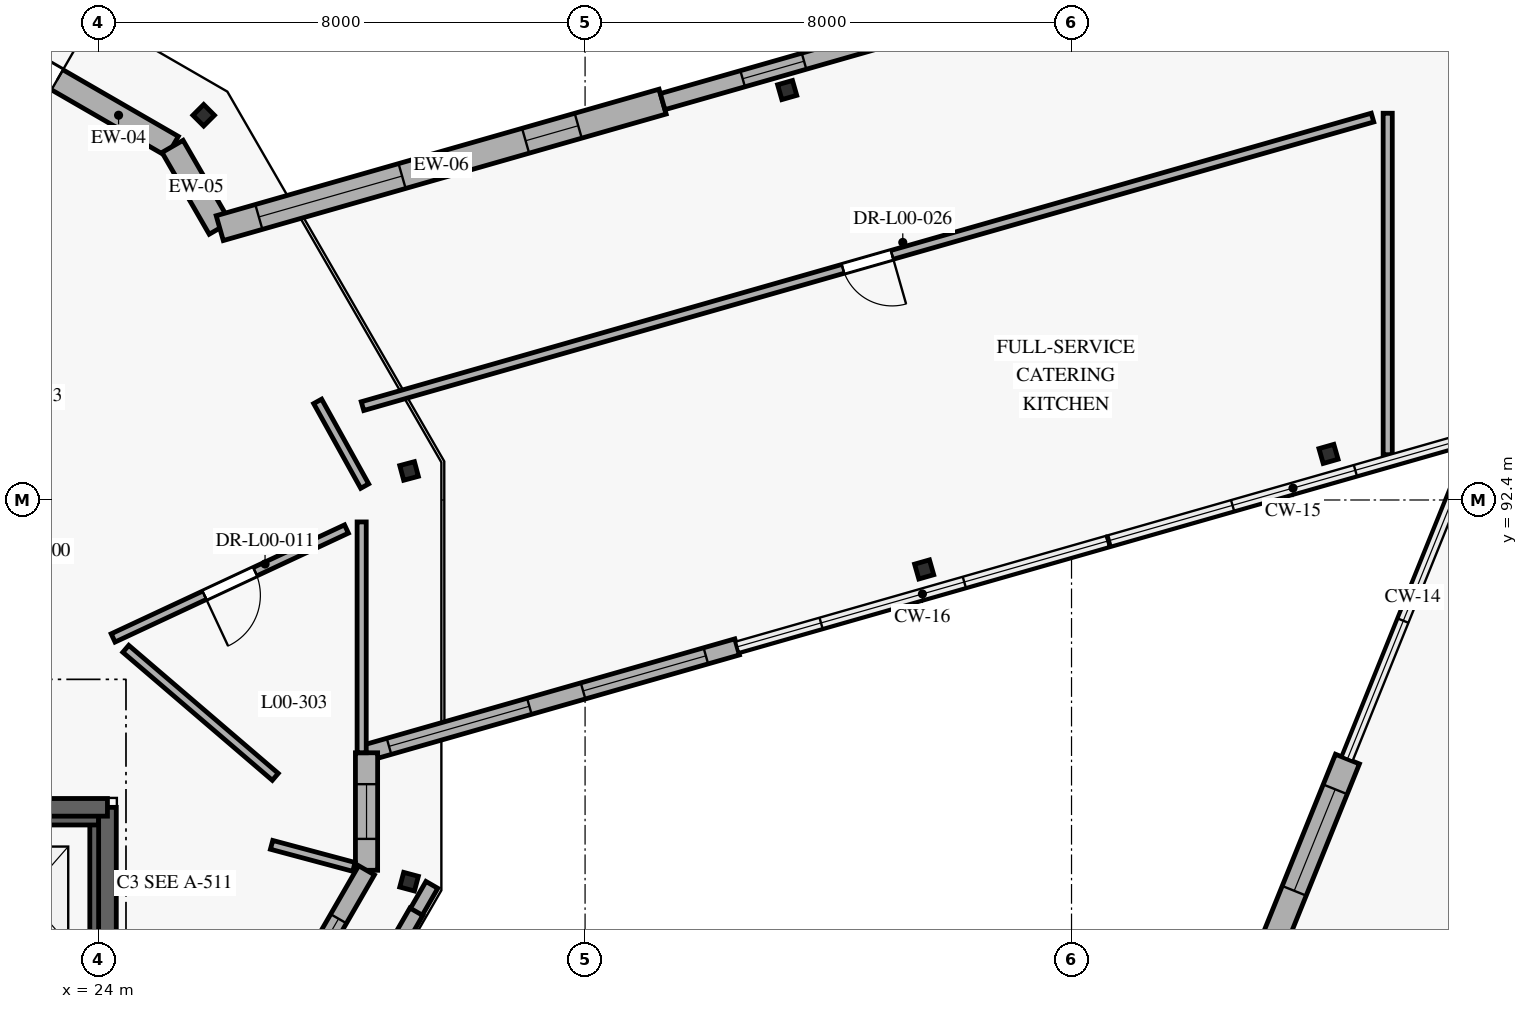
"""IFC4 building model, lengths in metres.
Left out: names, types, materials, properties, quantities, classifications, styles, units other than length and angle.
Written with IfcOpenShell. Run it as: python <this file> out.ifc"""

import sys

from ifc_helpers import new_model, si_unit, direction, frame, frame_2d, origin, origin_2d, place, context, subcontext, project, spatial, rectangle, hollow_rectangle, i_section, extrude, element, fill, save


model = new_model("IFC4")
c1 = context("Model", 3, precision=1e-05, world=origin(), true_north=direction((0.0, 1.0)))
c2 = subcontext(c1, "Body", "Model", "MODEL_VIEW")
j1 = project(units=[si_unit("LENGTHUNIT", "METRE"), si_unit("PLANEANGLEUNIT", "RADIAN")], contexts=[c1])
p1 = place(None, origin())
s1 = spatial("IfcSite", under=j1, at=p1, CompositionType="ELEMENT")
p2 = place(p1, origin())
s2 = spatial("IfcBuilding", under=s1, at=p2, CompositionType="ELEMENT")
p3 = place(p2, origin())
s3 = spatial("IfcBuildingStorey", under=s2, at=p3, CompositionType="ELEMENT", Elevation=0.0)
for number, where, z_axis, x_axis in (
    (1, (29.105, 92.878, 0.0), (0.0, 0.0, 1.0), (-0.259, 0.966, 0.0)),
    (2, (25.728, 98.728, 0.0), (0.0, 0.0, 1.0), (-0.707, 0.707, 0.0)),
    (3, (29.105, 86.122, 0.0), (0.0, 0.0, 1.0), (0.259, 0.966, 0.0)),
):
    element("IfcColumn", number, at=place(p3, frame(where, z_axis=z_axis, x_axis=x_axis)), inside=s3, PredefinedType="COLUMN", context=c2, shape_type="SweptSolid", body=[
        extrude(hollow_rectangle(XDim=0.25, YDim=0.25, WallThickness=0.012, InnerFilletRadius=0.012, OuterFilletRadius=0.019, at=origin_2d()), origin(), (0.0, 0.0, 1.0), 4.2),
    ])
for number, where, z_axis, x_axis in (
    (4, (35.323, 99.142, 0.0), (0.0, 0.0, 1.0), (0.962, 0.275, 0.0)),
    (5, (37.576, 91.258, 0.0), (0.0, 0.0, 1.0), (0.962, 0.275, 0.0)),
    (6, (44.226, 93.158, 0.0), (0.0, 0.0, 1.0), (0.962, 0.275, 0.0)),
):
    element("IfcColumn", number, at=place(p3, frame(where, z_axis=z_axis, x_axis=x_axis)), inside=s3, PredefinedType="COLUMN", context=c2, shape_type="SweptSolid", body=[
        extrude(i_section(OverallWidth=0.255, OverallDepth=0.254, WebThickness=0.009, FlangeThickness=0.014, FilletRadius=0.013, at=origin_2d()), origin(), (0.0, 0.0, 1.0), 4.2),
    ])
p4 = place(p3, frame((19.69, 101.406, 0.0), z_axis=(0.0, 0.0, 1.0), x_axis=(0.866044766488, -0.499966461314, 0.0)))
e7 = element("IfcWall", 7, at=p4, inside=s3, PredefinedType="SOLIDWALL", context=c2, shape_type="SweptSolid", body=[
    extrude(rectangle(XDim=6.38, YDim=0.38, at=frame_2d((3.19, 0.0))), origin(), (0.0, 0.0, 1.0), 3.94),
])
p5 = place(p4, frame((2.19, 0.0, 0.0)))
e8 = element("IfcOpeningElement", 8, at=p5, cuts=e7, PredefinedType="OPENING", context=c2, shape_type="SweptSolid", body=[
    extrude(rectangle(XDim=2.0, YDim=2.2, at=frame_2d((1.0, 1.1))), frame((0.0, 0.2, 0.0), z_axis=(0.0, -1.0, 0.0), x_axis=(1.0, 0.0, 0.0)), (0.0, 0.0, 1.0), 0.4),
])
p6 = place(p3, frame((25.216, 98.216, 0.0), z_axis=(0.0, 0.0, 1.0), x_axis=(0.499758756264, -0.866164641127, 0.0)))
e9 = element("IfcWall", 9, at=p6, inside=s3, PredefinedType="SOLIDWALL", context=c2, shape_type="SweptSolid", body=[
    extrude(rectangle(XDim=1.552, YDim=0.4, at=frame_2d((0.776, 0.0))), origin(), (0.0, 0.0, 1.0), 3.94),
])
p7 = place(p3, frame((25.992, 96.871, 0.0), z_axis=(0.0, 0.0, 1.0), x_axis=(0.961523947641, 0.274721127897, 0.0)))
e10 = element("IfcWall", 10, at=p7, inside=s3, PredefinedType="SOLIDWALL", context=c2, shape_type="SweptSolid", body=[
    extrude(rectangle(XDim=7.575, YDim=0.425, at=frame_2d((3.788, 0.0))), origin(), (0.0, 0.0, 1.0), 3.94),
])
p8 = place(p7, frame((0.669, 0.0, 0.85)))
e11 = element("IfcOpeningElement", 11, at=p8, cuts=e10, PredefinedType="OPENING", context=c2, shape_type="SweptSolid", body=[
    extrude(rectangle(XDim=2.45, YDim=1.4, at=frame_2d((1.225, 0.7))), frame((0.0, 0.222, 0.0), z_axis=(0.0, -1.0, 0.0), x_axis=(1.0, 0.0, 0.0)), (0.0, 0.0, 1.0), 0.445),
])
p9 = place(p7, frame((5.231, 0.0, 0.85)))
e12 = element("IfcOpeningElement", 12, at=p9, cuts=e10, PredefinedType="OPENING", context=c2, shape_type="SweptSolid", body=[
    extrude(rectangle(XDim=0.9, YDim=1.6, at=frame_2d((0.45, 0.8))), frame((0.0, 0.222, 0.0), z_axis=(0.0, -1.0, 0.0), x_axis=(1.0, 0.0, 0.0)), (0.0, 0.0, 1.0), 0.445),
])
p10 = place(p3, frame((33.275, 98.952, 0.0), z_axis=(0.0, 0.0, 1.0), x_axis=(0.961523947641, 0.274721127897, 0.0)))
e13 = element("IfcWall", 13, at=p10, inside=s3, PredefinedType="SOLIDWALL", context=c2, shape_type="SweptSolid", body=[
    extrude(rectangle(XDim=7.575, YDim=0.275, at=frame_2d((3.788, 0.0))), origin(), (0.0, 0.0, 1.0), 3.94),
])
p11 = place(p10, frame((1.369, 0.0, 0.85)))
e14 = element("IfcOpeningElement", 14, at=p11, cuts=e13, PredefinedType="OPENING", context=c2, shape_type="SweptSolid", body=[
    extrude(rectangle(XDim=1.05, YDim=1.6, at=frame_2d((0.525, 0.8))), frame((0.0, 0.147, 0.0), z_axis=(0.0, -1.0, 0.0), x_axis=(1.0, 0.0, 0.0)), (0.0, 0.0, 1.0), 0.295),
])
p12 = place(p10, frame((5.081, 0.0, 0.85)))
e15 = element("IfcOpeningElement", 15, at=p12, cuts=e13, PredefinedType="OPENING", context=c2, shape_type="SweptSolid", body=[
    extrude(rectangle(XDim=1.2, YDim=1.6, at=frame_2d((0.6, 0.8))), frame((0.0, 0.147, 0.0), z_axis=(0.0, -1.0, 0.0), x_axis=(1.0, 0.0, 0.0)), (0.0, 0.0, 1.0), 0.295),
])
p13 = place(p3, frame((42.385, 82.812, 0.0), z_axis=(0.0, 0.0, 1.0), x_axis=(0.374611990703, 0.927181673903, 0.0)))
e16 = element("IfcWall", 16, at=p13, inside=s3, PredefinedType="SOLIDWALL", context=c2, shape_type="SweptSolid", body=[
    extrude(rectangle(XDim=5.746, YDim=0.425, at=frame_2d((2.873, 0.0))), origin(), (0.0, 0.0, 1.0), 3.94),
])
p14 = place(p13, frame((0.686, 0.0, 0.85)))
e17 = element("IfcOpeningElement", 17, at=p14, cuts=e16, PredefinedType="OPENING", context=c2, shape_type="SweptSolid", body=[
    extrude(rectangle(XDim=1.5, YDim=1.15, at=frame_2d((0.75, 0.575))), frame((0.0, 0.222, 0.0), z_axis=(0.0, -1.0, 0.0), x_axis=(1.0, 0.0, 0.0)), (0.0, 0.0, 1.0), 0.445),
])
p15 = place(p13, frame((3.409, 0.0, 0.85)))
e18 = element("IfcOpeningElement", 18, at=p15, cuts=e16, PredefinedType="OPENING", context=c2, shape_type="SweptSolid", body=[
    extrude(rectangle(XDim=1.8, YDim=1.15, at=frame_2d((0.9, 0.575))), frame((0.0, 0.222, 0.0), z_axis=(0.0, -1.0, 0.0), x_axis=(1.0, 0.0, 0.0)), (0.0, 0.0, 1.0), 0.445),
])
p16 = place(p3, frame((34.5, 89.984, 0.0), z_axis=(0.0, 0.0, 1.0), x_axis=(-0.96152976126, -0.274700779415, 0.0)))
e19 = element("IfcWall", 19, at=p16, inside=s3, PredefinedType="SOLIDWALL", context=c2, shape_type="SweptSolid", body=[
    extrude(rectangle(XDim=6.339, YDim=0.275, at=frame_2d((3.169, 0.0))), origin(), (0.0, 0.0, 1.0), 3.94),
])
p17 = place(p16, frame((0.535, 0.0, 0.85)))
e20 = element("IfcOpeningElement", 20, at=p17, cuts=e19, PredefinedType="OPENING", context=c2, shape_type="SweptSolid", body=[
    extrude(rectangle(XDim=2.1, YDim=1.15, at=frame_2d((1.05, 0.575))), frame((0.0, 0.147, 0.0), z_axis=(0.0, -1.0, 0.0), x_axis=(1.0, 0.0, 0.0)), (0.0, 0.0, 1.0), 0.295),
])
p18 = place(p16, frame((3.554, 0.0, 0.85)))
e21 = element("IfcOpeningElement", 21, at=p18, cuts=e19, PredefinedType="OPENING", context=c2, shape_type="SweptSolid", body=[
    extrude(rectangle(XDim=2.4, YDim=1.15, at=frame_2d((1.2, 0.575))), frame((0.0, 0.147, 0.0), z_axis=(0.0, -1.0, 0.0), x_axis=(1.0, 0.0, 0.0)), (0.0, 0.0, 1.0), 0.295),
])
p19 = place(p3, frame((28.406, 88.242, 0.0), z_axis=(0.0, 0.0, 1.0), x_axis=(0.0, -1.0, 0.0)))
e22 = element("IfcWall", 22, at=p19, inside=s3, PredefinedType="SOLIDWALL", context=c2, shape_type="SweptSolid", body=[
    extrude(rectangle(XDim=1.933, YDim=0.365, at=frame_2d((0.966, 0.0))), origin(), (0.0, 0.0, 1.0), 3.94),
])
p20 = place(p19, frame((0.516, 0.0, 0.85)))
e23 = element("IfcOpeningElement", 23, at=p20, cuts=e22, PredefinedType="OPENING", context=c2, shape_type="SweptSolid", body=[
    extrude(rectangle(XDim=0.9, YDim=1.6, at=frame_2d((0.45, 0.8))), frame((0.0, 0.192, 0.0), z_axis=(0.0, -1.0, 0.0), x_axis=(1.0, 0.0, 0.0)), (0.0, 0.0, 1.0), 0.385),
])
p21 = place(p3, frame((28.406, 86.31, 0.0), z_axis=(0.0, 0.0, 1.0), x_axis=(-0.499966461314, -0.866044766488, 0.0)))
e24 = element("IfcWall", 24, at=p21, inside=s3, PredefinedType="SOLIDWALL", context=c2, shape_type="SweptSolid", body=[
    extrude(rectangle(XDim=6.38, YDim=0.3, at=frame_2d((3.19, 0.0))), origin(), (0.0, 0.0, 1.0), 3.94),
])
p22 = place(p21, frame((0.92, 0.0, 0.85)))
e25 = element("IfcOpeningElement", 25, at=p22, cuts=e24, PredefinedType="OPENING", context=c2, shape_type="SweptSolid", body=[
    extrude(rectangle(XDim=1.35, YDim=1.3, at=frame_2d((0.675, 0.65))), frame((0.0, 0.16, 0.0), z_axis=(0.0, -1.0, 0.0), x_axis=(1.0, 0.0, 0.0)), (0.0, 0.0, 1.0), 0.32),
])
p23 = place(p21, frame((3.91, 0.0, 0.85)))
e26 = element("IfcOpeningElement", 26, at=p23, cuts=e24, PredefinedType="OPENING", context=c2, shape_type="SweptSolid", body=[
    extrude(rectangle(XDim=1.75, YDim=1.3, at=frame_2d((0.875, 0.65))), frame((0.0, 0.16, 0.0), z_axis=(0.0, -1.0, 0.0), x_axis=(1.0, 0.0, 0.0)), (0.0, 0.0, 1.0), 0.32),
])
p24 = place(p3, frame((25.961, 79.973, 0.0), z_axis=(0.0, 0.0, 1.0), x_axis=(0.500010639957, 0.866019260715, 0.0)))
e27 = element("IfcWall", 27, at=p24, inside=s3, PredefinedType="ELEMENTEDWALL", context=c2, shape_type="SweptSolid", body=[
    extrude(rectangle(XDim=7.04, YDim=0.225, at=frame_2d((3.52, 0.0))), origin(), (0.0, 0.0, 1.0), 0.55),
])
p25 = place(p3, frame((28.856, 84.988, 0.55), z_axis=(0.0, 0.0, 1.0), x_axis=(0.500189527592, 0.865915952323, 0.0)))
e28 = element("IfcWall", 28, at=p25, inside=s3, PredefinedType="ELEMENTEDWALL", context=c2, shape_type="SweptSolid", body=[
    extrude(rectangle(XDim=0.739, YDim=0.245, at=frame_2d((0.37, 0.0))), origin(), (0.0, 0.0, 1.0), 3.39),
])
p26 = place(p3, frame((24.0, 84.6, -1.4), z_axis=(0.0, 0.0, 1.0), x_axis=(0.0, 1.0, 0.0)))
e29 = element("IfcWall", 29, at=p26, inside=s3, PredefinedType="SHEAR", context=c2, shape_type="SweptSolid", body=[
    extrude(rectangle(XDim=2.6, YDim=0.29, at=frame_2d((1.3, 0.0))), origin(), (0.0, 0.0, 1.0), 1.4),
])
p27 = place(p3, frame((24.0, 87.2, -1.4), z_axis=(0.0, 0.0, 1.0), x_axis=(-1.0, 0.0, 0.0)))
e30 = element("IfcWall", 30, at=p27, inside=s3, PredefinedType="SHEAR", context=c2, shape_type="SweptSolid", body=[
    extrude(rectangle(XDim=2.4, YDim=0.29, at=frame_2d((1.2, 0.0))), origin(), (0.0, 0.0, 1.0), 1.4),
])
p28 = place(p3, frame((24.145, 84.455, 0.0), z_axis=(0.0, 0.0, 1.0), x_axis=(0.0, 1.0, 0.0)))
e31 = element("IfcWall", 31, at=p28, inside=s3, PredefinedType="SHEAR", context=c2, shape_type="SweptSolid", body=[
    extrude(rectangle(XDim=2.89, YDim=0.29, at=frame_2d((1.445, 0.0))), origin(), (0.0, 0.0, 1.0), 3.95),
])
p29 = place(p3, frame((24.145, 87.345, 0.0), z_axis=(0.0, 0.0, 1.0), x_axis=(-1.0, 0.0, 0.0)))
e32 = element("IfcWall", 32, at=p29, inside=s3, PredefinedType="SHEAR", context=c2, shape_type="SweptSolid", body=[
    extrude(rectangle(XDim=2.69, YDim=0.29, at=frame_2d((1.345, 0.0))), origin(), (0.0, 0.0, 1.0), 3.95),
])
p30 = place(p3, frame((26.844, 86.728, 0.0), z_axis=(0.0, 0.0, 1.0), x_axis=(0.965916169592, -0.258855081698, 0.0)))
e33 = element("IfcWall", 33, at=p30, inside=s3, PredefinedType="PARTITIONING", context=c2, shape_type="SweptSolid", body=[
    extrude(rectangle(XDim=1.402, YDim=0.15, at=frame_2d((0.701, 0.0))), origin(), (0.0, 0.0, 1.0), 3.915),
])
p31 = place(p3, frame((28.326, 88.243, 0.0), z_axis=(0.0, 0.0, 1.0), x_axis=(0.0, 1.0, 0.0)))
e34 = element("IfcWall", 34, at=p31, inside=s3, PredefinedType="PARTITIONING", context=c2, shape_type="SweptSolid", body=[
    extrude(rectangle(XDim=3.796, YDim=0.15, at=frame_2d((1.898, 0.0))), origin(), (0.0, 0.0, 1.0), 3.915),
])
p32 = place(p3, frame((28.076, 91.923, 0.0), z_axis=(0.0, 0.0, 1.0), x_axis=(-0.906140423984, -0.422976987579, 0.0)))
e35 = element("IfcWall", 35, at=p32, inside=s3, PredefinedType="PARTITIONING", context=c2, shape_type="SweptSolid", body=[
    extrude(rectangle(XDim=4.235, YDim=0.15, at=frame_2d((2.117, 0.0))), origin(), (0.0, 0.0, 1.0), 3.915),
])
p33 = place(p32, frame((1.657, 0.0, 0.0)))
e36 = element("IfcOpeningElement", 36, at=p33, cuts=e35, PredefinedType="OPENING", context=c2, shape_type="SweptSolid", body=[
    extrude(rectangle(XDim=0.92, YDim=2.08, at=frame_2d((0.46, 1.04))), frame((0.0, 0.085, 0.0), z_axis=(0.0, -1.0, 0.0), x_axis=(1.0, 0.0, 0.0)), (0.0, 0.0, 1.0), 0.17),
])
p34 = place(p3, frame((24.447, 89.953, 0.0), z_axis=(0.0, 0.0, 1.0), x_axis=(0.759458863271, -0.650555328161, 0.0)))
e37 = element("IfcWall", 37, at=p34, inside=s3, PredefinedType="PARTITIONING", context=c2, shape_type="SweptSolid", body=[
    extrude(rectangle(XDim=3.237, YDim=0.15, at=frame_2d((1.619, 0.0))), origin(), (0.0, 0.0, 1.0), 3.915),
])
p35 = place(p3, frame((45.2, 93.145, 0.0), z_axis=(0.0, 0.0, 1.0), x_axis=(0.0, 1.0, 0.0)))
e38 = element("IfcWall", 38, at=p35, inside=s3, PredefinedType="PARTITIONING", context=c2, shape_type="SweptSolid", body=[
    extrude(rectangle(XDim=5.616, YDim=0.15, at=frame_2d((2.808, 0.0))), origin(), (0.0, 0.0, 1.0), 3.915),
])
p36 = place(p3, frame((44.95, 98.689, 0.0), z_axis=(0.0, 0.0, 1.0), x_axis=(-0.961522347689, -0.274726727666, 0.0)))
e39 = element("IfcWall", 39, at=p36, inside=s3, PredefinedType="PARTITIONING", context=c2, shape_type="SweptSolid", body=[
    extrude(rectangle(XDim=17.275, YDim=0.15, at=frame_2d((8.637, 0.0))), origin(), (0.0, 0.0, 1.0), 3.915),
])
p37 = place(p36, frame((8.217, 0.0, 0.0)))
e40 = element("IfcOpeningElement", 40, at=p37, cuts=e39, PredefinedType="OPENING", context=c2, shape_type="SweptSolid", body=[
    extrude(rectangle(XDim=0.84, YDim=2.04, at=frame_2d((0.42, 1.02))), frame((0.0, 0.085, 0.0), z_axis=(0.0, -1.0, 0.0), x_axis=(1.0, 0.0, 0.0)), (0.0, 0.0, 1.0), 0.17),
])
p38 = place(p3, frame((27.602, 94.022, 0.0), z_axis=(0.0, 0.0, 1.0), x_axis=(0.485330821968, -0.874330597227, 0.0)))
e41 = element("IfcWall", 41, at=p38, inside=s3, PredefinedType="PARTITIONING", context=c2, shape_type="SweptSolid", body=[
    extrude(rectangle(XDim=1.594, YDim=0.15, at=frame_2d((0.797, 0.0))), origin(), (0.0, 0.0, 1.0), 3.915),
])
p39 = place(p5, origin())
e42 = element("IfcDoor", 42, at=p39, inside=s3, OperationType="DOUBLE_DOOR_SINGLE_SWING", PredefinedType="DOOR", context=c2, shape_type="SweptSolid", body=[
    extrude(rectangle(XDim=2.0, YDim=2.2, at=frame_2d((1.0, 1.1))), frame((0.0, 0.025, 0.0), z_axis=(0.0, -1.0, 0.0), x_axis=(1.0, 0.0, 0.0)), (0.0, 0.0, 1.0), 0.05),
])
fill(e8, e42)
p40 = place(p8, origin())
e43 = element("IfcWindow", 43, at=p40, inside=s3, PartitioningType="SINGLE_PANEL", PredefinedType="WINDOW", context=c2, shape_type="SweptSolid", body=[
    extrude(rectangle(XDim=2.45, YDim=1.4, at=frame_2d((1.225, 0.7))), frame((0.0, 0.03, 0.0), z_axis=(0.0, -1.0, 0.0), x_axis=(1.0, 0.0, 0.0)), (0.0, 0.0, 1.0), 0.06),
])
fill(e11, e43)
p41 = place(p9, origin())
e44 = element("IfcWindow", 44, at=p41, inside=s3, PartitioningType="SINGLE_PANEL", PredefinedType="WINDOW", context=c2, shape_type="SweptSolid", body=[
    extrude(rectangle(XDim=0.9, YDim=1.6, at=frame_2d((0.45, 0.8))), frame((0.0, 0.03, 0.0), z_axis=(0.0, -1.0, 0.0), x_axis=(1.0, 0.0, 0.0)), (0.0, 0.0, 1.0), 0.06),
])
fill(e12, e44)
p42 = place(p11, origin())
e45 = element("IfcWindow", 45, at=p42, inside=s3, PartitioningType="SINGLE_PANEL", PredefinedType="WINDOW", context=c2, shape_type="SweptSolid", body=[
    extrude(rectangle(XDim=1.05, YDim=1.6, at=frame_2d((0.525, 0.8))), frame((0.0, 0.03, 0.0), z_axis=(0.0, -1.0, 0.0), x_axis=(1.0, 0.0, 0.0)), (0.0, 0.0, 1.0), 0.06),
])
fill(e14, e45)
p43 = place(p15, origin())
e46 = element("IfcWindow", 46, at=p43, inside=s3, PartitioningType="SINGLE_PANEL", PredefinedType="WINDOW", context=c2, shape_type="SweptSolid", body=[
    extrude(rectangle(XDim=1.8, YDim=1.15, at=frame_2d((0.9, 0.575))), frame((0.0, 0.03, 0.0), z_axis=(0.0, -1.0, 0.0), x_axis=(1.0, 0.0, 0.0)), (0.0, 0.0, 1.0), 0.06),
])
fill(e18, e46)
p44 = place(p17, origin())
e47 = element("IfcWindow", 47, at=p44, inside=s3, PartitioningType="SINGLE_PANEL", PredefinedType="WINDOW", context=c2, shape_type="SweptSolid", body=[
    extrude(rectangle(XDim=2.1, YDim=1.15, at=frame_2d((1.05, 0.575))), frame((0.0, 0.03, 0.0), z_axis=(0.0, -1.0, 0.0), x_axis=(1.0, 0.0, 0.0)), (0.0, 0.0, 1.0), 0.06),
])
fill(e20, e47)
p45 = place(p18, origin())
e48 = element("IfcWindow", 48, at=p45, inside=s3, PartitioningType="SINGLE_PANEL", PredefinedType="WINDOW", context=c2, shape_type="SweptSolid", body=[
    extrude(rectangle(XDim=2.4, YDim=1.15, at=frame_2d((1.2, 0.575))), frame((0.0, 0.03, 0.0), z_axis=(0.0, -1.0, 0.0), x_axis=(1.0, 0.0, 0.0)), (0.0, 0.0, 1.0), 0.06),
])
fill(e21, e48)
p46 = place(p20, origin())
e49 = element("IfcWindow", 49, at=p46, inside=s3, PartitioningType="SINGLE_PANEL", PredefinedType="WINDOW", context=c2, shape_type="SweptSolid", body=[
    extrude(rectangle(XDim=0.9, YDim=1.6, at=frame_2d((0.45, 0.8))), frame((0.0, 0.03, 0.0), z_axis=(0.0, -1.0, 0.0), x_axis=(1.0, 0.0, 0.0)), (0.0, 0.0, 1.0), 0.06),
])
fill(e23, e49)
p47 = place(p22, origin())
e50 = element("IfcWindow", 50, at=p47, inside=s3, PartitioningType="SINGLE_PANEL", PredefinedType="WINDOW", context=c2, shape_type="SweptSolid", body=[
    extrude(rectangle(XDim=1.35, YDim=1.3, at=frame_2d((0.675, 0.65))), frame((0.0, 0.03, 0.0), z_axis=(0.0, -1.0, 0.0), x_axis=(1.0, 0.0, 0.0)), (0.0, 0.0, 1.0), 0.06),
])
fill(e25, e50)
p48 = place(p33, origin())
e51 = element("IfcDoor", 51, at=p48, inside=s3, OperationType="SINGLE_SWING_RIGHT", PredefinedType="DOOR", context=c2, shape_type="SweptSolid", body=[
    extrude(rectangle(XDim=0.92, YDim=2.08, at=frame_2d((0.46, 1.04))), frame((0.0, 0.025, 0.0), z_axis=(0.0, -1.0, 0.0), x_axis=(1.0, 0.0, 0.0)), (0.0, 0.0, 1.0), 0.05),
])
fill(e36, e51)
p49 = place(p37, origin())
e52 = element("IfcDoor", 52, at=p49, inside=s3, OperationType="SINGLE_SWING_LEFT", PredefinedType="DOOR", context=c2, shape_type="SweptSolid", body=[
    extrude(rectangle(XDim=0.84, YDim=2.04, at=frame_2d((0.42, 1.02))), frame((0.0, 0.025, 0.0), z_axis=(0.0, -1.0, 0.0), x_axis=(1.0, 0.0, 0.0)), (0.0, 0.0, 1.0), 0.05),
])
fill(e40, e52)
save(model, sys.argv[1])
